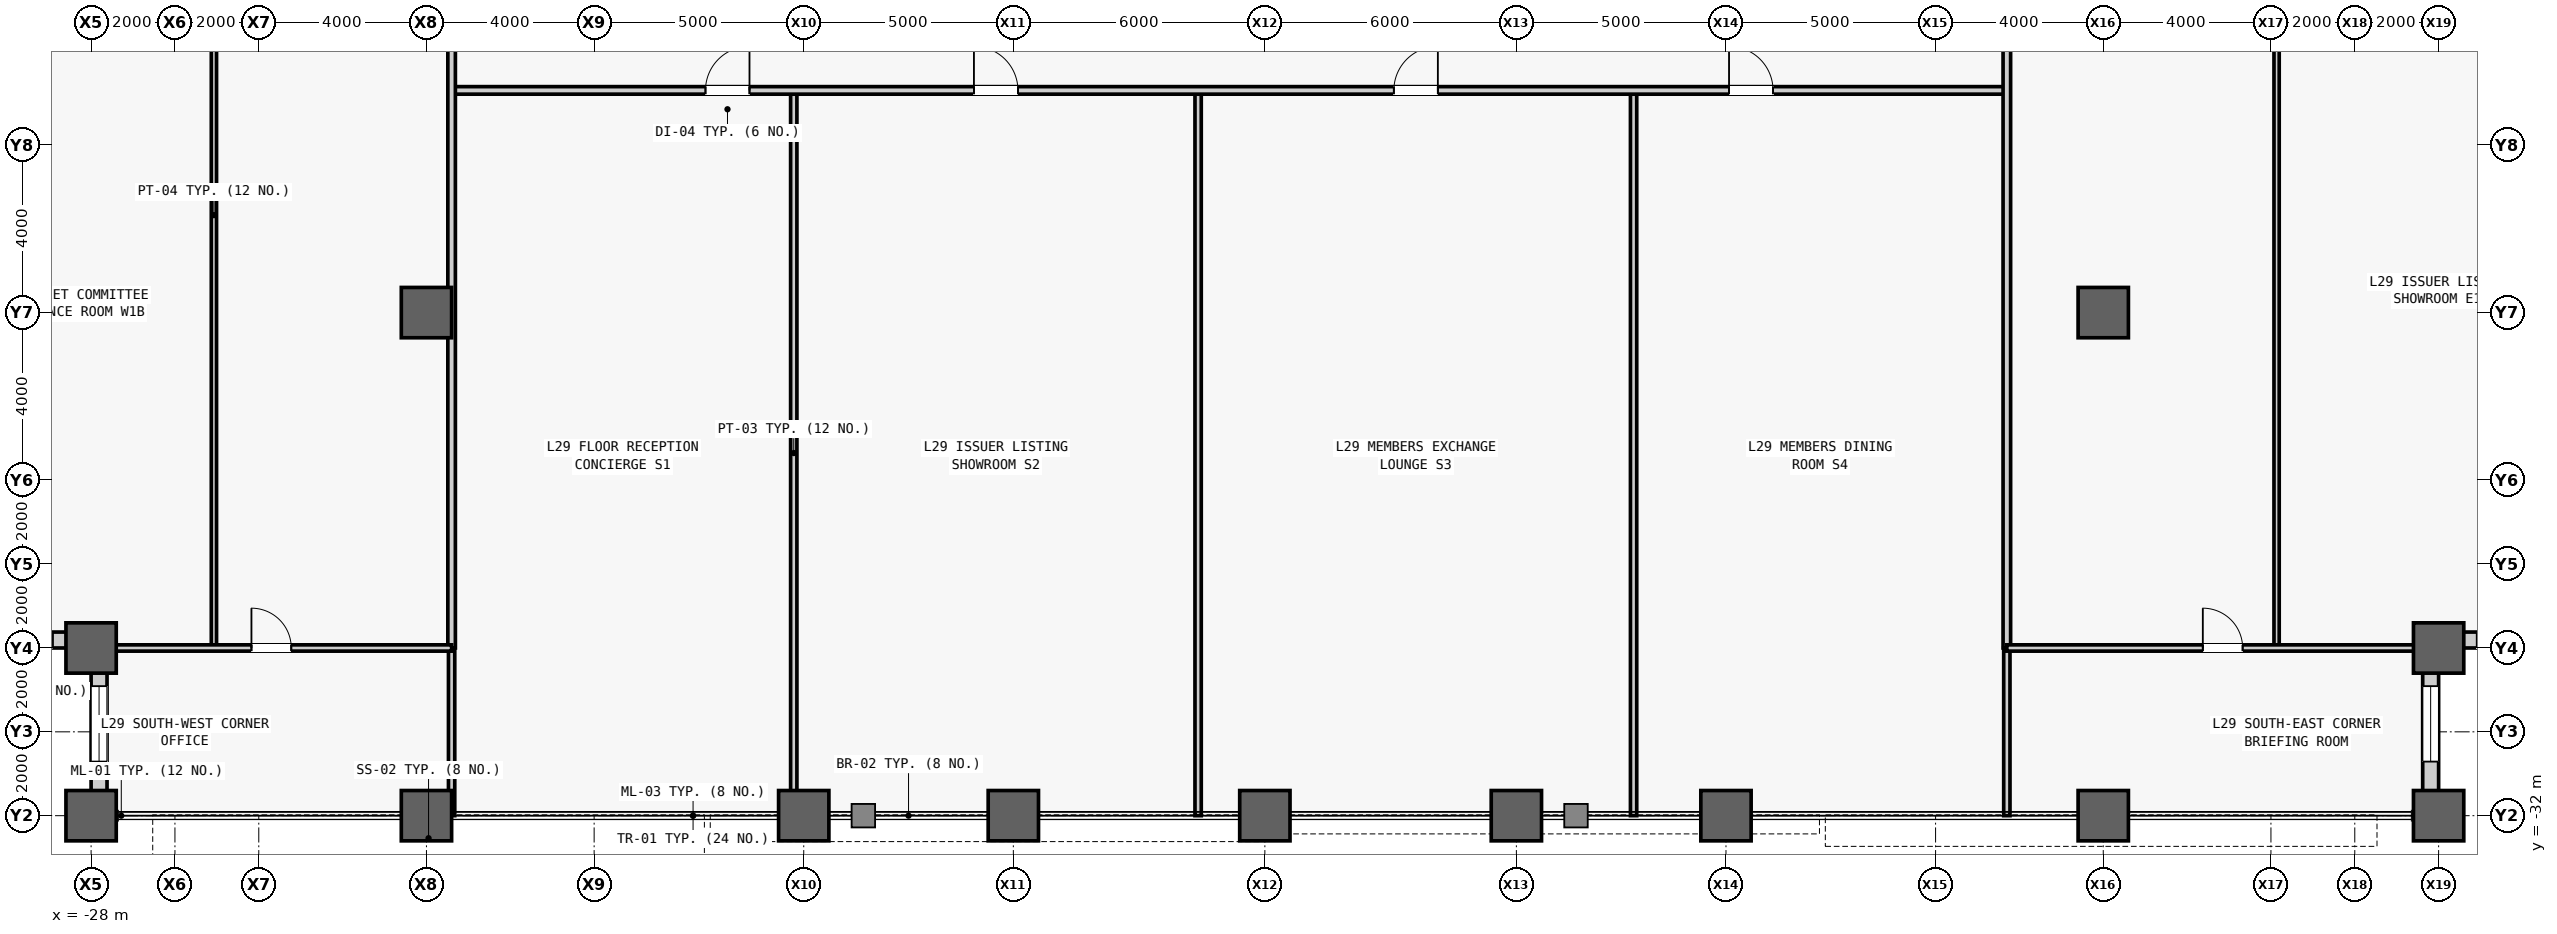
"""IFC4 building model, lengths in metres.
Left out: names, types, materials, properties, quantities, classifications, styles, units other than length and angle.
Written with IfcOpenShell. Run it as: python <this file> out.ifc"""

import sys

from ifc_helpers import new_model, si_unit, direction, frame, frame_2d, origin, origin_2d, place, context, subcontext, project, spatial, rectangle, hollow_rectangle, extrude, source, transform, mapped, element, fill, save


model = new_model("IFC4")
c1 = context("Model", 3, precision=1e-05, world=origin(), true_north=direction((0.0, 1.0)))
c2 = subcontext(c1, "Body", "Model", "MODEL_VIEW")
j1 = project(units=[si_unit("LENGTHUNIT", "METRE"), si_unit("PLANEANGLEUNIT", "RADIAN")], contexts=[c1])
p1 = place(None, origin())
s1 = spatial("IfcSite", under=j1, at=p1, CompositionType="ELEMENT")
p2 = place(p1, origin())
s2 = spatial("IfcBuilding", under=s1, at=p2, CompositionType="ELEMENT")
p3 = place(p2, frame((0.0, 0.0, 128.3)))
s3 = spatial("IfcBuildingStorey", under=s2, at=p3, CompositionType="ELEMENT", Elevation=128.3)
m1 = source(origin(), c2, "Body", "SweptSolid", [
    extrude(hollow_rectangle(XDim=1.2, YDim=1.2, WallThickness=0.07, at=origin_2d()), origin(), (0.0, 0.0, 1.0), 4.1),
])
for number, where, z_axis, x_axis in (
    (1, (-28.0, -32.0, 0.0), (0.0, 0.0, 1.0), (1.0, 0.0, 0.0)),
    (2, (-28.0, -28.0, 0.0), (0.0, 0.0, 1.0), (1.0, 0.0, 0.0)),
    (3, (-20.0, -32.0, 0.0), (0.0, 0.0, 1.0), (1.0, 0.0, 0.0)),
    (4, (-20.0, -20.0, 0.0), (0.0, 0.0, 1.0), (1.0, 0.0, 0.0)),
    (5, (-11.0, -32.0, 0.0), (0.0, 0.0, 1.0), (1.0, 0.0, 0.0)),
    (6, (-6.0, -32.0, 0.0), (0.0, 0.0, 1.0), (1.0, 0.0, 0.0)),
    (7, (0.0, -32.0, 0.0), (0.0, 0.0, 1.0), (1.0, 0.0, 0.0)),
    (8, (6.0, -32.0, 0.0), (0.0, 0.0, 1.0), (1.0, 0.0, 0.0)),
    (9, (11.0, -32.0, 0.0), (0.0, 0.0, 1.0), (1.0, 0.0, 0.0)),
    (10, (20.0, -32.0, 0.0), (0.0, 0.0, 1.0), (1.0, 0.0, 0.0)),
    (11, (20.0, -20.0, 0.0), (0.0, 0.0, 1.0), (1.0, 0.0, 0.0)),
    (12, (28.0, -32.0, 0.0), (0.0, 0.0, 1.0), (1.0, 0.0, 0.0)),
    (13, (28.0, -28.0, 0.0), (0.0, 0.0, 1.0), (1.0, 0.0, 0.0)),
):
    element("IfcColumn", number, at=place(p3, frame(where, z_axis=z_axis, x_axis=x_axis)), inside=s3, PredefinedType="COLUMN", context=c2, shape_type="MappedRepresentation", body=[
        mapped(m1, transform((0.0, 0.0, 0.0), scale=1.0)),
    ])
m2 = source(origin(), c2, "Body", "SweptSolid", [
    extrude(rectangle(XDim=3.62, YDim=0.38, at=frame_2d((1.81, 0.0))), origin(), (0.0, 0.0, 1.0), 3.145),
])
p4 = place(p3, frame((-28.0, -27.81, 0.0), z_axis=(0.0, 0.0, 1.0), x_axis=(-1.0, 0.0, 0.0)))
e14 = element("IfcWall", 14, at=p4, inside=s3, PredefinedType="STANDARD", context=c2, shape_type="MappedRepresentation", body=[
    mapped(m2, transform((0.0, 0.0, 0.0), scale=1.0)),
])
m3 = source(origin(), c2, "Body", "SweptSolid", [
    extrude(rectangle(XDim=1.8, YDim=2.4, at=frame_2d((0.9, 1.2))), frame((0.0, 0.2, 0.0), z_axis=(0.0, -1.0, 0.0), x_axis=(1.0, 0.0, 0.0)), (0.0, 0.0, 1.0), 0.4),
])
p5 = place(p4, frame((0.91, 0.0, 0.5)))
e15 = element("IfcOpeningElement", 15, at=p5, cuts=e14, PredefinedType="OPENING", context=c2, shape_type="MappedRepresentation", body=[
    mapped(m3, transform((0.0, 0.0, 0.0), scale=1.0)),
])
p6 = place(p3, frame((-27.81, -31.62, 0.0), z_axis=(0.0, 0.0, 1.0), x_axis=(0.0, 1.0, 0.0)))
e16 = element("IfcWall", 16, at=p6, inside=s3, PredefinedType="STANDARD", context=c2, shape_type="MappedRepresentation", body=[
    mapped(m2, transform((0.0, 0.0, 0.0), scale=1.0)),
])
p7 = place(p6, frame((0.91, 0.0, 0.5)))
e17 = element("IfcOpeningElement", 17, at=p7, cuts=e16, PredefinedType="OPENING", context=c2, shape_type="MappedRepresentation", body=[
    mapped(m3, transform((0.0, 0.0, 0.0), scale=1.0)),
])
p8 = place(p3, frame((27.81, -31.62, 0.0), z_axis=(0.0, 0.0, 1.0), x_axis=(0.0, 1.0, 0.0)))
e18 = element("IfcWall", 18, at=p8, inside=s3, PredefinedType="STANDARD", context=c2, shape_type="MappedRepresentation", body=[
    mapped(m2, transform((0.0, 0.0, 0.0), scale=1.0)),
])
p9 = place(p8, frame((0.91, 0.0, 0.5)))
e19 = element("IfcOpeningElement", 19, at=p9, cuts=e18, PredefinedType="OPENING", context=c2, shape_type="MappedRepresentation", body=[
    mapped(m3, transform((0.0, 0.0, 0.0), scale=1.0)),
])
p10 = place(p3, frame((28.0, -27.81, 0.0), z_axis=(0.0, 0.0, 1.0), x_axis=(1.0, 0.0, 0.0)))
e20 = element("IfcWall", 20, at=p10, inside=s3, PredefinedType="STANDARD", context=c2, shape_type="MappedRepresentation", body=[
    mapped(m2, transform((0.0, 0.0, 0.0), scale=1.0)),
])
p11 = place(p10, frame((0.91, 0.0, 0.5)))
e21 = element("IfcOpeningElement", 21, at=p11, cuts=e20, PredefinedType="OPENING", context=c2, shape_type="MappedRepresentation", body=[
    mapped(m3, transform((0.0, 0.0, 0.0), scale=1.0)),
])
m4 = source(origin(), c2, "Body", "SweptSolid", [
    extrude(rectangle(XDim=17.3, YDim=0.15, at=frame_2d((8.65, 0.0))), origin(), (0.0, 0.0, 1.0), 3.067),
])
p12 = place(p3, frame((-11.238, -32.0, 0.0), z_axis=(0.0, 0.0, 1.0), x_axis=(0.0, 1.0, 0.0)))
e22 = element("IfcWall", 22, at=p12, inside=s3, PredefinedType="PARTITIONING", context=c2, shape_type="MappedRepresentation", body=[
    mapped(m4, transform((0.0, 0.0, 0.0), scale=1.0)),
])
m5 = source(origin(), c2, "Body", "SweptSolid", [
    extrude(rectangle(XDim=17.3, YDim=0.15, at=frame_2d((8.65, 0.0))), origin(), (0.0, 0.0, 1.0), 3.84),
])
for number, where, z_axis, x_axis in (
    (23, (-1.592, -32.0, 0.0), (0.0, 0.0, 1.0), (0.0, 1.0, 0.0)),
    (24, (8.796, -32.0, 0.0), (0.0, 0.0, 1.0), (0.0, 1.0, 0.0)),
):
    element("IfcWall", number, at=place(p3, frame(where, z_axis=z_axis, x_axis=x_axis)), inside=s3, PredefinedType="PARTITIONING", context=c2, shape_type="MappedRepresentation", body=[
        mapped(m5, transform((0.0, 0.0, 0.0), scale=1.0)),
    ])
m6 = source(origin(), c2, "Body", "SweptSolid", [
    extrude(rectangle(XDim=37.1, YDim=0.18, at=frame_2d((18.55, 0.0))), origin(), (0.0, 0.0, 1.0), 3.84),
])
p13 = place(p3, frame((-19.4, -14.7, 0.0), z_axis=(0.0, 0.0, 1.0), x_axis=(1.0, 0.0, 0.0)))
e25 = element("IfcWall", 25, at=p13, inside=s3, PredefinedType="PARTITIONING", context=c2, shape_type="MappedRepresentation", body=[
    mapped(m6, transform((0.0, 0.0, 0.0), scale=1.0)),
])
m7 = source(origin(), c2, "Body", "SweptSolid", [
    extrude(rectangle(XDim=1.05, YDim=2.2, at=frame_2d((0.525, 1.1))), frame((0.0, 0.1, 0.0), z_axis=(0.0, -1.0, 0.0), x_axis=(1.0, 0.0, 0.0)), (0.0, 0.0, 1.0), 0.2),
])
p14 = place(p13, frame((6.056, 0.0, 0.0)))
e26 = element("IfcOpeningElement", 26, at=p14, cuts=e25, PredefinedType="OPENING", context=c2, shape_type="MappedRepresentation", body=[
    mapped(m7, transform((0.0, 0.0, 0.0), scale=1.0)),
])
p15 = place(p13, frame((12.46, 0.0, 0.0)))
e27 = element("IfcOpeningElement", 27, at=p15, cuts=e25, PredefinedType="OPENING", context=c2, shape_type="MappedRepresentation", body=[
    mapped(m7, transform((0.0, 0.0, 0.0), scale=1.0)),
])
p16 = place(p13, frame((22.477, 0.0, 0.0)))
e28 = element("IfcOpeningElement", 28, at=p16, cuts=e25, PredefinedType="OPENING", context=c2, shape_type="MappedRepresentation", body=[
    mapped(m7, transform((0.0, 0.0, 0.0), scale=1.0)),
])
p17 = place(p13, frame((30.473, 0.0, 0.0)))
e29 = element("IfcOpeningElement", 29, at=p17, cuts=e25, PredefinedType="OPENING", context=c2, shape_type="MappedRepresentation", body=[
    mapped(m7, transform((0.0, 0.0, 0.0), scale=1.0)),
])
m8 = source(origin(), c2, "Body", "SweptSolid", [
    extrude(rectangle(XDim=4.0, YDim=0.15, at=frame_2d((2.0, 0.0))), origin(), (0.0, 0.0, 1.0), 3.84),
])
for number, where, z_axis, x_axis in (
    (30, (-19.4, -32.0, 0.0), (0.0, 0.0, 1.0), (0.0, 1.0, 0.0)),
    (31, (17.7, -32.0, 0.0), (0.0, 0.0, 1.0), (0.0, 1.0, 0.0)),
):
    element("IfcWall", number, at=place(p3, frame(where, z_axis=z_axis, x_axis=x_axis)), inside=s3, PredefinedType="PARTITIONING", context=c2, shape_type="MappedRepresentation", body=[
        mapped(m8, transform((0.0, 0.0, 0.0), scale=1.0)),
    ])
m9 = source(origin(), c2, "Body", "SweptSolid", [
    extrude(rectangle(XDim=20.65, YDim=0.125, at=frame_2d((10.325, 0.0))), origin(), (0.0, 0.0, 1.0), 3.84),
])
p18 = place(p3, frame((-25.07, -28.0, 0.0), z_axis=(0.0, 0.0, 1.0), x_axis=(0.0, 1.0, 0.0)))
e32 = element("IfcWall", 32, at=p18, inside=s3, PredefinedType="PARTITIONING", context=c2, shape_type="MappedRepresentation", body=[
    mapped(m9, transform((0.0, 0.0, 0.0), scale=1.0)),
])
m10 = source(origin(), c2, "Body", "SweptSolid", [
    extrude(rectangle(XDim=0.95, YDim=2.15, at=frame_2d((0.475, 1.075))), frame((0.0, 0.073, 0.0), z_axis=(0.0, -1.0, 0.0), x_axis=(1.0, 0.0, 0.0)), (0.0, 0.0, 1.0), 0.145),
])
p19 = place(p18, frame((16.5, 0.0, 0.0)))
e33 = element("IfcOpeningElement", 33, at=p19, cuts=e32, PredefinedType="OPENING", context=c2, shape_type="MappedRepresentation", body=[
    mapped(m10, transform((0.0, 0.0, 0.0), scale=1.0)),
])
m11 = source(origin(), c2, "Body", "SweptSolid", [
    extrude(rectangle(XDim=56.0, YDim=0.18, at=frame_2d((28.0, 0.0))), origin(), (0.0, 0.0, 1.0), 3.371),
])
p20 = place(p3, frame((-19.4, -28.0, 0.0), z_axis=(0.0, 0.0, 1.0), x_axis=(0.0, 1.0, 0.0)))
e34 = element("IfcWall", 34, at=p20, inside=s3, PredefinedType="PARTITIONING", context=c2, shape_type="MappedRepresentation", body=[
    mapped(m11, transform((0.0, 0.0, 0.0), scale=1.0)),
])
m12 = source(origin(), c2, "Body", "SweptSolid", [
    extrude(rectangle(XDim=0.95, YDim=2.15, at=frame_2d((0.475, 1.075))), frame((0.0, 0.1, 0.0), z_axis=(0.0, -1.0, 0.0), x_axis=(1.0, 0.0, 0.0)), (0.0, 0.0, 1.0), 0.2),
])
p21 = place(p20, frame((16.8, 0.0, 0.0)))
e35 = element("IfcOpeningElement", 35, at=p21, cuts=e34, PredefinedType="OPENING", context=c2, shape_type="MappedRepresentation", body=[
    mapped(m12, transform((0.0, 0.0, 0.0), scale=1.0)),
])
p22 = place(p20, frame((24.732, 0.0, 0.0)))
e36 = element("IfcOpeningElement", 36, at=p22, cuts=e34, PredefinedType="OPENING", context=c2, shape_type="MappedRepresentation", body=[
    mapped(m12, transform((0.0, 0.0, 0.0), scale=1.0)),
])
p23 = place(p20, frame((33.111, 0.0, 0.0)))
e37 = element("IfcOpeningElement", 37, at=p23, cuts=e34, PredefinedType="OPENING", context=c2, shape_type="MappedRepresentation", body=[
    mapped(m12, transform((0.0, 0.0, 0.0), scale=1.0)),
])
p24 = place(p20, frame((39.279, 0.0, 0.0)))
e38 = element("IfcOpeningElement", 38, at=p24, cuts=e34, PredefinedType="OPENING", context=c2, shape_type="MappedRepresentation", body=[
    mapped(m12, transform((0.0, 0.0, 0.0), scale=1.0)),
])
m13 = source(origin(), c2, "Body", "SweptSolid", [
    extrude(rectangle(XDim=21.532, YDim=0.125, at=frame_2d((10.766, 0.0))), origin(), (0.0, 0.0, 1.0), 3.84),
])
p25 = place(p3, frame((24.135, -28.0, 0.0), z_axis=(0.0, 0.0, 1.0), x_axis=(0.0, 1.0, 0.0)))
e39 = element("IfcWall", 39, at=p25, inside=s3, PredefinedType="PARTITIONING", context=c2, shape_type="MappedRepresentation", body=[
    mapped(m13, transform((0.0, 0.0, 0.0), scale=1.0)),
])
p26 = place(p25, frame((16.941, 0.0, 0.0)))
e40 = element("IfcOpeningElement", 40, at=p26, cuts=e39, PredefinedType="OPENING", context=c2, shape_type="MappedRepresentation", body=[
    mapped(m10, transform((0.0, 0.0, 0.0), scale=1.0)),
])
m14 = source(origin(), c2, "Body", "SweptSolid", [
    extrude(rectangle(XDim=56.0, YDim=0.18, at=frame_2d((28.0, 0.0))), origin(), (0.0, 0.0, 1.0), 3.84),
])
p27 = place(p3, frame((17.7, -28.0, 0.0), z_axis=(0.0, 0.0, 1.0), x_axis=(0.0, 1.0, 0.0)))
e41 = element("IfcWall", 41, at=p27, inside=s3, PredefinedType="PARTITIONING", context=c2, shape_type="MappedRepresentation", body=[
    mapped(m14, transform((0.0, 0.0, 0.0), scale=1.0)),
])
p28 = place(p27, frame((17.241, 0.0, 0.0)))
e42 = element("IfcOpeningElement", 42, at=p28, cuts=e41, PredefinedType="OPENING", context=c2, shape_type="MappedRepresentation", body=[
    mapped(m12, transform((0.0, 0.0, 0.0), scale=1.0)),
])
p29 = place(p27, frame((26.055, 0.0, 0.0)))
e43 = element("IfcOpeningElement", 43, at=p29, cuts=e41, PredefinedType="OPENING", context=c2, shape_type="MappedRepresentation", body=[
    mapped(m12, transform((0.0, 0.0, 0.0), scale=1.0)),
])
p30 = place(p27, frame((36.339, 0.0, 0.0)))
e44 = element("IfcOpeningElement", 44, at=p30, cuts=e41, PredefinedType="OPENING", context=c2, shape_type="MappedRepresentation", body=[
    mapped(m12, transform((0.0, 0.0, 0.0), scale=1.0)),
])
m15 = source(origin(), c2, "Body", "SweptSolid", [
    extrude(rectangle(XDim=8.6, YDim=0.15, at=frame_2d((4.3, 0.0))), origin(), (0.0, 0.0, 1.0), 3.84),
])
p31 = place(p3, frame((-28.0, -28.0, 0.0), z_axis=(0.0, 0.0, 1.0), x_axis=(1.0, 0.0, 0.0)))
e45 = element("IfcWall", 45, at=p31, inside=s3, PredefinedType="PARTITIONING", context=c2, shape_type="MappedRepresentation", body=[
    mapped(m15, transform((0.0, 0.0, 0.0), scale=1.0)),
])
m16 = source(origin(), c2, "Body", "SweptSolid", [
    extrude(rectangle(XDim=0.95, YDim=2.15, at=frame_2d((0.475, 1.075))), frame((0.0, 0.085, 0.0), z_axis=(0.0, -1.0, 0.0), x_axis=(1.0, 0.0, 0.0)), (0.0, 0.0, 1.0), 0.17),
])
p32 = place(p31, frame((3.825, 0.0, 0.0)))
e46 = element("IfcOpeningElement", 46, at=p32, cuts=e45, PredefinedType="OPENING", context=c2, shape_type="MappedRepresentation", body=[
    mapped(m16, transform((0.0, 0.0, 0.0), scale=1.0)),
])
m17 = source(origin(), c2, "Body", "SweptSolid", [
    extrude(rectangle(XDim=10.3, YDim=0.15, at=frame_2d((5.15, 0.0))), origin(), (0.0, 0.0, 1.0), 3.84),
])
p33 = place(p3, frame((17.7, -28.0, 0.0), z_axis=(0.0, 0.0, 1.0), x_axis=(1.0, 0.0, 0.0)))
e47 = element("IfcWall", 47, at=p33, inside=s3, PredefinedType="PARTITIONING", context=c2, shape_type="MappedRepresentation", body=[
    mapped(m17, transform((0.0, 0.0, 0.0), scale=1.0)),
])
p34 = place(p33, frame((4.675, 0.0, 0.0)))
e48 = element("IfcOpeningElement", 48, at=p34, cuts=e47, PredefinedType="OPENING", context=c2, shape_type="MappedRepresentation", body=[
    mapped(m16, transform((0.0, 0.0, 0.0), scale=1.0)),
])
m18 = source(origin(), c2, "Body", "SweptSolid", [
    extrude(rectangle(XDim=1.8, YDim=2.4, at=frame_2d((0.9, 1.2))), frame((0.0, 0.03, 0.0), z_axis=(0.0, -1.0, 0.0), x_axis=(1.0, 0.0, 0.0)), (0.0, 0.0, 1.0), 0.06),
])
p35 = place(p5, origin())
e49 = element("IfcWindow", 49, at=p35, inside=s3, PartitioningType="SINGLE_PANEL", PredefinedType="WINDOW", context=c2, shape_type="MappedRepresentation", body=[
    mapped(m18, transform((0.0, 0.0, 0.0), scale=1.0)),
])
fill(e15, e49)
p36 = place(p7, origin())
e50 = element("IfcWindow", 50, at=p36, inside=s3, PartitioningType="SINGLE_PANEL", PredefinedType="WINDOW", context=c2, shape_type="MappedRepresentation", body=[
    mapped(m18, transform((0.0, 0.0, 0.0), scale=1.0)),
])
fill(e17, e50)
p37 = place(p9, origin())
e51 = element("IfcWindow", 51, at=p37, inside=s3, PartitioningType="SINGLE_PANEL", PredefinedType="WINDOW", context=c2, shape_type="MappedRepresentation", body=[
    mapped(m18, transform((0.0, 0.0, 0.0), scale=1.0)),
])
fill(e19, e51)
p38 = place(p11, origin())
e52 = element("IfcWindow", 52, at=p38, inside=s3, PartitioningType="SINGLE_PANEL", PredefinedType="WINDOW", context=c2, shape_type="MappedRepresentation", body=[
    mapped(m18, transform((0.0, 0.0, 0.0), scale=1.0)),
])
fill(e21, e52)
m19 = source(origin(), c2, "Body", "SweptSolid", [
    extrude(rectangle(XDim=1.05, YDim=2.2, at=frame_2d((0.525, 1.1))), frame((0.0, 0.025, 0.0), z_axis=(0.0, -1.0, 0.0), x_axis=(1.0, 0.0, 0.0)), (0.0, 0.0, 1.0), 0.05),
])
p39 = place(p14, origin())
e53 = element("IfcDoor", 53, at=p39, inside=s3, OperationType="SINGLE_SWING_RIGHT", PredefinedType="DOOR", context=c2, shape_type="MappedRepresentation", body=[
    mapped(m19, transform((0.0, 0.0, 0.0), scale=1.0)),
])
fill(e26, e53)
p40 = place(p15, origin())
e54 = element("IfcDoor", 54, at=p40, inside=s3, OperationType="SINGLE_SWING_LEFT", PredefinedType="DOOR", context=c2, shape_type="MappedRepresentation", body=[
    mapped(m19, transform((0.0, 0.0, 0.0), scale=1.0)),
])
fill(e27, e54)
p41 = place(p16, origin())
e55 = element("IfcDoor", 55, at=p41, inside=s3, OperationType="SINGLE_SWING_RIGHT", PredefinedType="DOOR", context=c2, shape_type="MappedRepresentation", body=[
    mapped(m19, transform((0.0, 0.0, 0.0), scale=1.0)),
])
fill(e28, e55)
p42 = place(p17, origin())
e56 = element("IfcDoor", 56, at=p42, inside=s3, OperationType="SINGLE_SWING_LEFT", PredefinedType="DOOR", context=c2, shape_type="MappedRepresentation", body=[
    mapped(m19, transform((0.0, 0.0, 0.0), scale=1.0)),
])
fill(e29, e56)
m20 = source(origin(), c2, "Body", "SweptSolid", [
    extrude(rectangle(XDim=0.95, YDim=2.15, at=frame_2d((0.475, 1.075))), frame((0.0, 0.025, 0.0), z_axis=(0.0, -1.0, 0.0), x_axis=(1.0, 0.0, 0.0)), (0.0, 0.0, 1.0), 0.05),
])
p43 = place(p32, origin())
e57 = element("IfcDoor", 57, at=p43, inside=s3, OperationType="SINGLE_SWING_LEFT", PredefinedType="DOOR", context=c2, shape_type="MappedRepresentation", body=[
    mapped(m20, transform((0.0, 0.0, 0.0), scale=1.0)),
])
fill(e46, e57)
p44 = place(p34, origin())
e58 = element("IfcDoor", 58, at=p44, inside=s3, OperationType="SINGLE_SWING_LEFT", PredefinedType="DOOR", context=c2, shape_type="MappedRepresentation", body=[
    mapped(m20, transform((0.0, 0.0, 0.0), scale=1.0)),
])
fill(e48, e58)
save(model, sys.argv[1])
